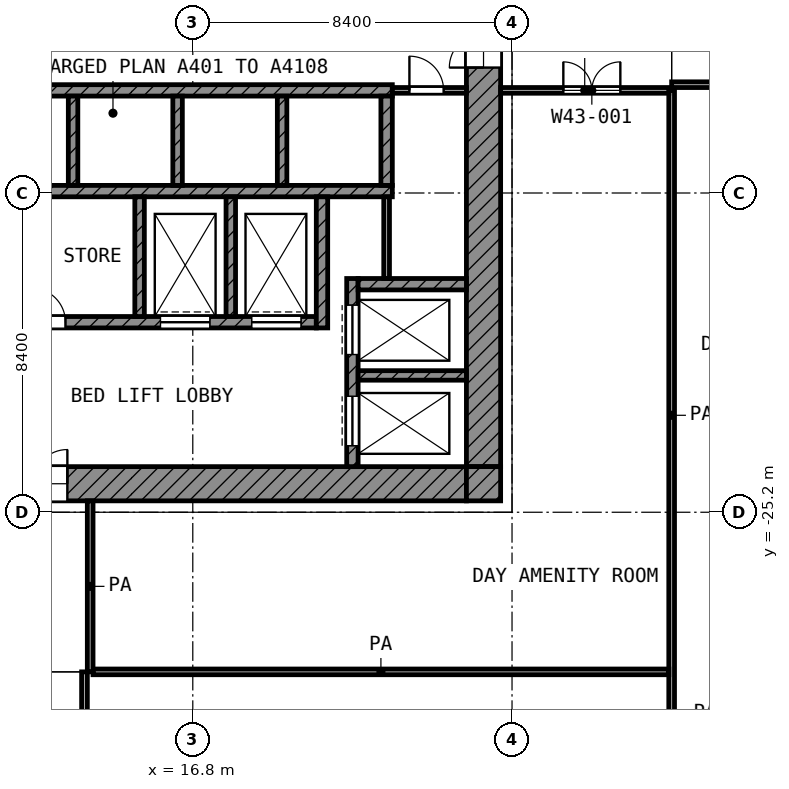
"""IFC4 building model, lengths in metres.
Left out: names, types, materials, properties, quantities, classifications, styles, units other than length and angle.
Written with IfcOpenShell. Run it as: python <this file> out.ifc"""

import sys

from ifc_helpers import new_model, si_unit, direction, frame, frame_2d, origin, place, context, subcontext, project, spatial, rectangle, extrude, element, fill, save


model = new_model("IFC4")
c1 = context("Model", 3, precision=1e-05, world=origin(), true_north=direction((0.0, 1.0)))
c2 = subcontext(c1, "Body", "Model", "MODEL_VIEW")
j1 = project(units=[si_unit("LENGTHUNIT", "METRE"), si_unit("PLANEANGLEUNIT", "RADIAN")], contexts=[c1])
p1 = place(None, origin())
s1 = spatial("IfcSite", under=j1, at=p1, CompositionType="ELEMENT")
p2 = place(p1, origin())
s2 = spatial("IfcBuilding", under=s1, at=p2, CompositionType="ELEMENT")
p3 = place(p2, frame((0.0, 0.0, 208.8)))
s3 = spatial("IfcBuildingStorey", under=s2, at=p3, CompositionType="ELEMENT", Elevation=208.8)
p4 = place(p3, frame((24.45, -24.0, 0.0), z_axis=(0.0, 0.0, 1.0), x_axis=(0.0, 1.0, 0.0)))
e1 = element("IfcWall", 1, at=p4, inside=s3, PredefinedType="SHEAR", context=c2, shape_type="SweptSolid", body=[
    extrude(rectangle(XDim=18.6, YDim=0.9, at=frame_2d((9.3, 0.0))), origin(), (0.0, 0.0, 1.0), 3.7),
])
p5 = place(p4, frame((10.5, 0.0, 0.0)))
e2 = element("IfcOpeningElement", 2, at=p5, cuts=e1, PredefinedType="OPENING", context=c2, shape_type="SweptSolid", body=[
    extrude(rectangle(XDim=1.8, YDim=2.1, at=frame_2d((0.9, 1.05))), frame((0.0, 0.46, 0.0), z_axis=(0.0, -1.0, 0.0), x_axis=(1.0, 0.0, 0.0)), (0.0, 0.0, 1.0), 0.92),
])
p6 = place(p3, frame((5.4, -24.45, 0.0), z_axis=(0.0, 0.0, 1.0), x_axis=(1.0, 0.0, 0.0)))
e3 = element("IfcWall", 3, at=p6, inside=s3, PredefinedType="SHEAR", context=c2, shape_type="SweptSolid", body=[
    extrude(rectangle(XDim=18.6, YDim=0.9, at=frame_2d((9.3, 0.0))), origin(), (0.0, 0.0, 1.0), 3.7),
])
p7 = place(p6, frame((6.3, 0.0, 0.0)))
e4 = element("IfcOpeningElement", 4, at=p7, cuts=e3, PredefinedType="OPENING", context=c2, shape_type="SweptSolid", body=[
    extrude(rectangle(XDim=1.8, YDim=2.1, at=frame_2d((0.9, 1.05))), frame((0.0, 0.46, 0.0), z_axis=(0.0, -1.0, 0.0), x_axis=(1.0, 0.0, 0.0)), (0.0, 0.0, 1.0), 0.92),
])
p8 = place(p3, frame((24.45, -24.9, 0.0), z_axis=(0.0, 0.0, 1.0), x_axis=(0.0, 1.0, 0.0)))
e5 = element("IfcWall", 5, at=p8, inside=s3, PredefinedType="SHEAR", context=c2, shape_type="SweptSolid", body=[
    extrude(rectangle(XDim=0.9, YDim=0.9, at=frame_2d((0.45, 0.0))), origin(), (0.0, 0.0, 1.0), 3.7),
])
p9 = place(p3, frame((5.4, -14.1, 0.0), z_axis=(0.0, 0.0, 1.0), x_axis=(1.0, 0.0, 0.0)))
e6 = element("IfcWall", 6, at=p9, inside=s3, PredefinedType="SHEAR", context=c2, shape_type="SweptSolid", body=[
    extrude(rectangle(XDim=16.65, YDim=0.3, at=frame_2d((8.325, 0.0))), origin(), (0.0, 0.0, 1.0), 3.7),
])
p10 = place(p9, frame((0.825, 0.0, 0.0)))
e7 = element("IfcOpeningElement", 7, at=p10, cuts=e6, PredefinedType="OPENING", context=c2, shape_type="SweptSolid", body=[
    extrude(rectangle(XDim=1.1, YDim=2.1, at=frame_2d((0.55, 1.05))), frame((0.0, 0.16, 0.0), z_axis=(0.0, -1.0, 0.0), x_axis=(1.0, 0.0, 0.0)), (0.0, 0.0, 1.0), 0.32),
])
p11 = place(p9, frame((3.575, 0.0, 0.0)))
e8 = element("IfcOpeningElement", 8, at=p11, cuts=e6, PredefinedType="OPENING", context=c2, shape_type="SweptSolid", body=[
    extrude(rectangle(XDim=1.1, YDim=2.1, at=frame_2d((0.55, 1.05))), frame((0.0, 0.16, 0.0), z_axis=(0.0, -1.0, 0.0), x_axis=(1.0, 0.0, 0.0)), (0.0, 0.0, 1.0), 0.32),
])
p12 = place(p3, frame((5.4, -16.75, 0.0), z_axis=(0.0, 0.0, 1.0), x_axis=(1.0, 0.0, 0.0)))
e9 = element("IfcWall", 9, at=p12, inside=s3, PredefinedType="SHEAR", context=c2, shape_type="SweptSolid", body=[
    extrude(rectangle(XDim=16.65, YDim=0.3, at=frame_2d((8.325, 0.0))), origin(), (0.0, 0.0, 1.0), 3.7),
])
p13 = place(p3, frame((5.4, -20.2, 0.0), z_axis=(0.0, 0.0, 1.0), x_axis=(1.0, 0.0, 0.0)))
e10 = element("IfcWall", 10, at=p13, inside=s3, PredefinedType="SHEAR", context=c2, shape_type="SweptSolid", body=[
    extrude(rectangle(XDim=14.65, YDim=0.3, at=frame_2d((7.325, 0.0))), origin(), (0.0, 0.0, 1.0), 3.7),
])
p14 = place(p13, frame((10.55, 0.0, 0.0)))
e11 = element("IfcOpeningElement", 11, at=p14, cuts=e10, PredefinedType="OPENING", context=c2, shape_type="SweptSolid", body=[
    extrude(rectangle(XDim=1.3, YDim=2.1, at=frame_2d((0.65, 1.05))), frame((0.0, 0.16, 0.0), z_axis=(0.0, -1.0, 0.0), x_axis=(1.0, 0.0, 0.0)), (0.0, 0.0, 1.0), 0.32),
])
p15 = place(p13, frame((12.95, 0.0, 0.0)))
e12 = element("IfcOpeningElement", 12, at=p15, cuts=e10, PredefinedType="OPENING", context=c2, shape_type="SweptSolid", body=[
    extrude(rectangle(XDim=1.3, YDim=2.1, at=frame_2d((0.65, 1.05))), frame((0.0, 0.16, 0.0), z_axis=(0.0, -1.0, 0.0), x_axis=(1.0, 0.0, 0.0)), (0.0, 0.0, 1.0), 0.32),
])
p16 = place(p13, frame((0.55, 0.0, 0.0)))
e13 = element("IfcOpeningElement", 13, at=p16, cuts=e10, PredefinedType="OPENING", context=c2, shape_type="SweptSolid", body=[
    extrude(rectangle(XDim=1.3, YDim=2.1, at=frame_2d((0.65, 1.05))), frame((0.0, 0.16, 0.0), z_axis=(0.0, -1.0, 0.0), x_axis=(1.0, 0.0, 0.0)), (0.0, 0.0, 1.0), 0.32),
])
p17 = place(p13, frame((2.95, 0.0, 0.0)))
e14 = element("IfcOpeningElement", 14, at=p17, cuts=e10, PredefinedType="OPENING", context=c2, shape_type="SweptSolid", body=[
    extrude(rectangle(XDim=1.3, YDim=2.1, at=frame_2d((0.65, 1.05))), frame((0.0, 0.16, 0.0), z_axis=(0.0, -1.0, 0.0), x_axis=(1.0, 0.0, 0.0)), (0.0, 0.0, 1.0), 0.32),
])
p18 = place(p13, frame((7.15, 0.0, 0.0)))
e15 = element("IfcOpeningElement", 15, at=p18, cuts=e10, PredefinedType="OPENING", context=c2, shape_type="SweptSolid", body=[
    extrude(rectangle(XDim=0.9, YDim=2.1, at=frame_2d((0.45, 1.05))), frame((0.0, 0.16, 0.0), z_axis=(0.0, -1.0, 0.0), x_axis=(1.0, 0.0, 0.0)), (0.0, 0.0, 1.0), 0.32),
])
p19 = place(p3, frame((20.2, -20.35, 0.0), z_axis=(0.0, 0.0, 1.0), x_axis=(0.0, 1.0, 0.0)))
e16 = element("IfcWall", 16, at=p19, inside=s3, PredefinedType="SHEAR", context=c2, shape_type="SweptSolid", body=[
    extrude(rectangle(XDim=3.45, YDim=0.3, at=frame_2d((1.725, 0.0))), origin(), (0.0, 0.0, 1.0), 3.7),
])
p20 = place(p3, frame((21.9, -16.6, 0.0), z_axis=(0.0, 0.0, 1.0), x_axis=(0.0, 1.0, 0.0)))
e17 = element("IfcWall", 17, at=p20, inside=s3, PredefinedType="SHEAR", context=c2, shape_type="SweptSolid", body=[
    extrude(rectangle(XDim=2.35, YDim=0.3, at=frame_2d((1.175, 0.0))), origin(), (0.0, 0.0, 1.0), 3.7),
])
p21 = place(p3, frame((21.15, -19.2, 0.0), z_axis=(0.0, 0.0, 1.0), x_axis=(1.0, 0.0, 0.0)))
e18 = element("IfcWall", 18, at=p21, inside=s3, PredefinedType="SHEAR", context=c2, shape_type="SweptSolid", body=[
    extrude(rectangle(XDim=2.85, YDim=0.3, at=frame_2d((1.425, 0.0))), origin(), (0.0, 0.0, 1.0), 3.7),
])
p22 = place(p3, frame((21.0, -24.0, 0.0), z_axis=(0.0, 0.0, 1.0), x_axis=(0.0, 1.0, 0.0)))
e19 = element("IfcWall", 19, at=p22, inside=s3, PredefinedType="SHEAR", context=c2, shape_type="SweptSolid", body=[
    extrude(rectangle(XDim=4.95, YDim=0.3, at=frame_2d((2.475, 0.0))), origin(), (0.0, 0.0, 1.0), 3.7),
])
p23 = place(p22, frame((2.95, 0.0, 0.0)))
e20 = element("IfcOpeningElement", 20, at=p23, cuts=e19, PredefinedType="OPENING", context=c2, shape_type="SweptSolid", body=[
    extrude(rectangle(XDim=1.3, YDim=2.1, at=frame_2d((0.65, 1.05))), frame((0.0, 0.16, 0.0), z_axis=(0.0, -1.0, 0.0), x_axis=(1.0, 0.0, 0.0)), (0.0, 0.0, 1.0), 0.32),
])
p24 = place(p22, frame((0.55, 0.0, 0.0)))
e21 = element("IfcOpeningElement", 21, at=p24, cuts=e19, PredefinedType="OPENING", context=c2, shape_type="SweptSolid", body=[
    extrude(rectangle(XDim=1.3, YDim=2.1, at=frame_2d((0.65, 1.05))), frame((0.0, 0.16, 0.0), z_axis=(0.0, -1.0, 0.0), x_axis=(1.0, 0.0, 0.0)), (0.0, 0.0, 1.0), 0.32),
])
p25 = place(p3, frame((21.15, -21.6, 0.0), z_axis=(0.0, 0.0, 1.0), x_axis=(1.0, 0.0, 0.0)))
e22 = element("IfcWall", 22, at=p25, inside=s3, PredefinedType="SHEAR", context=c2, shape_type="SweptSolid", body=[
    extrude(rectangle(XDim=2.85, YDim=0.25, at=frame_2d((1.425, 0.0))), origin(), (0.0, 0.0, 1.0), 3.7),
])
for number, where, z_axis, x_axis in (
    (23, (15.4, -20.05, 0.0), (0.0, 0.0, 1.0), (0.0, 1.0, 0.0)),
    (24, (17.8, -20.05, 0.0), (0.0, 0.0, 1.0), (0.0, 1.0, 0.0)),
):
    element("IfcWall", number, at=place(p3, frame(where, z_axis=z_axis, x_axis=x_axis)), inside=s3, PredefinedType="SHEAR", context=c2, shape_type="SweptSolid", body=[
        extrude(rectangle(XDim=3.15, YDim=0.25, at=frame_2d((1.575, 0.0))), origin(), (0.0, 0.0, 1.0), 3.7),
    ])
for number, where, z_axis, x_axis in (
    (25, (13.65, -16.6, 0.0), (0.0, 0.0, 1.0), (0.0, 1.0, 0.0)),
    (26, (16.4, -16.6, 0.0), (0.0, 0.0, 1.0), (0.0, 1.0, 0.0)),
    (27, (19.15, -16.6, 0.0), (0.0, 0.0, 1.0), (0.0, 1.0, 0.0)),
):
    element("IfcWall", number, at=place(p3, frame(where, z_axis=z_axis, x_axis=x_axis)), inside=s3, PredefinedType="SHEAR", context=c2, shape_type="SweptSolid", body=[
        extrude(rectangle(XDim=2.35, YDim=0.25, at=frame_2d((1.175, 0.0))), origin(), (0.0, 0.0, 1.0), 3.7),
    ])
p26 = place(p3, frame((21.9, -19.05, 0.0), z_axis=(0.0, 0.0, 1.0), x_axis=(0.0, 1.0, 0.0)))
e28 = element("IfcWall", 28, at=p26, inside=s3, PredefinedType="PARTITIONING", context=c2, shape_type="SweptSolid", body=[
    extrude(rectangle(XDim=2.15, YDim=0.15, at=frame_2d((1.075, 0.0))), origin(), (0.0, 0.0, 1.0), 3.7),
])
p27 = place(p3, frame((22.05, -14.1, 0.0), z_axis=(0.0, 0.0, 1.0), x_axis=(1.0, 0.0, 0.0)))
e29 = element("IfcWall", 29, at=p27, inside=s3, PredefinedType="PARTITIONING", context=c2, shape_type="SweptSolid", body=[
    extrude(rectangle(XDim=1.95, YDim=0.15, at=frame_2d((0.975, 0.0))), origin(), (0.0, 0.0, 1.0), 3.7),
])
p28 = place(p27, frame((0.45, 0.0, 0.0)))
e30 = element("IfcOpeningElement", 30, at=p28, cuts=e29, PredefinedType="OPENING", context=c2, shape_type="SweptSolid", body=[
    extrude(rectangle(XDim=0.9, YDim=2.1, at=frame_2d((0.45, 1.05))), frame((0.0, 0.085, 0.0), z_axis=(0.0, -1.0, 0.0), x_axis=(1.0, 0.0, 0.0)), (0.0, 0.0, 1.0), 0.17),
])
p29 = place(p3, frame((14.175, -29.4, 0.0), z_axis=(0.0, 0.0, 1.0), x_axis=(1.0, 0.0, 0.0)))
e31 = element("IfcWall", 31, at=p29, inside=s3, PredefinedType="PARTITIONING", context=c2, shape_type="SweptSolid", body=[
    extrude(rectangle(XDim=15.15, YDim=0.15, at=frame_2d((7.575, 0.0))), origin(), (0.0, 0.0, 1.0), 3.7),
])
p30 = place(p3, frame((24.9, -14.1, 0.0), z_axis=(0.0, 0.0, 1.0), x_axis=(1.0, 0.0, 0.0)))
e32 = element("IfcWall", 32, at=p30, inside=s3, PredefinedType="PARTITIONING", context=c2, shape_type="SweptSolid", body=[
    extrude(rectangle(XDim=4.425, YDim=0.15, at=frame_2d((2.212, 0.0))), origin(), (0.0, 0.0, 1.0), 3.7),
])
p31 = place(p30, frame((1.65, 0.0, 0.0)))
e33 = element("IfcOpeningElement", 33, at=p31, cuts=e32, PredefinedType="OPENING", context=c2, shape_type="SweptSolid", body=[
    extrude(rectangle(XDim=1.5, YDim=2.1, at=frame_2d((0.75, 1.05))), frame((0.0, 0.085, 0.0), z_axis=(0.0, -1.0, 0.0), x_axis=(1.0, 0.0, 0.0)), (0.0, 0.0, 1.0), 0.17),
])
p32 = place(p3, frame((29.4, -13.95, 0.0), z_axis=(0.0, 0.0, 1.0), x_axis=(1.0, 0.0, 0.0)))
e34 = element("IfcWall", 34, at=p32, inside=s3, PredefinedType="PARTITIONING", context=c2, shape_type="SweptSolid", body=[
    extrude(rectangle(XDim=37.72, YDim=0.15, at=frame_2d((18.86, 0.0))), origin(), (0.0, 0.0, 1.0), 3.7),
])
p33 = place(p32, frame((1.6, 0.0, 0.0)))
e35 = element("IfcOpeningElement", 35, at=p33, cuts=e34, PredefinedType="OPENING", context=c2, shape_type="SweptSolid", body=[
    extrude(rectangle(XDim=1.0, YDim=2.1, at=frame_2d((0.5, 1.05))), frame((0.0, 0.085, 0.0), z_axis=(0.0, -1.0, 0.0), x_axis=(1.0, 0.0, 0.0)), (0.0, 0.0, 1.0), 0.17),
])
p34 = place(p32, frame((6.0, 0.0, 0.0)))
e36 = element("IfcOpeningElement", 36, at=p34, cuts=e34, PredefinedType="OPENING", context=c2, shape_type="SweptSolid", body=[
    extrude(rectangle(XDim=1.2, YDim=2.1, at=frame_2d((0.6, 1.05))), frame((0.0, 0.085, 0.0), z_axis=(0.0, -1.0, 0.0), x_axis=(1.0, 0.0, 0.0)), (0.0, 0.0, 1.0), 0.17),
])
p35 = place(p32, frame((12.975, 0.0, 0.0)))
e37 = element("IfcOpeningElement", 37, at=p35, cuts=e34, PredefinedType="OPENING", context=c2, shape_type="SweptSolid", body=[
    extrude(rectangle(XDim=1.2, YDim=2.1, at=frame_2d((0.6, 1.05))), frame((0.0, 0.085, 0.0), z_axis=(0.0, -1.0, 0.0), x_axis=(1.0, 0.0, 0.0)), (0.0, 0.0, 1.0), 0.17),
])
p36 = place(p32, frame((11.45, 0.0, 0.0)))
e38 = element("IfcOpeningElement", 38, at=p36, cuts=e34, PredefinedType="OPENING", context=c2, shape_type="SweptSolid", body=[
    extrude(rectangle(XDim=1.2, YDim=2.1, at=frame_2d((0.6, 1.05))), frame((0.0, 0.085, 0.0), z_axis=(0.0, -1.0, 0.0), x_axis=(1.0, 0.0, 0.0)), (0.0, 0.0, 1.0), 0.17),
])
p37 = place(p32, frame((14.85, 0.0, 0.0)))
e39 = element("IfcOpeningElement", 39, at=p37, cuts=e34, PredefinedType="OPENING", context=c2, shape_type="SweptSolid", body=[
    extrude(rectangle(XDim=1.2, YDim=2.1, at=frame_2d((0.6, 1.05))), frame((0.0, 0.085, 0.0), z_axis=(0.0, -1.0, 0.0), x_axis=(1.0, 0.0, 0.0)), (0.0, 0.0, 1.0), 0.17),
])
p38 = place(p32, frame((21.6, 0.0, 0.0)))
e40 = element("IfcOpeningElement", 40, at=p38, cuts=e34, PredefinedType="OPENING", context=c2, shape_type="SweptSolid", body=[
    extrude(rectangle(XDim=1.2, YDim=2.1, at=frame_2d((0.6, 1.05))), frame((0.0, 0.085, 0.0), z_axis=(0.0, -1.0, 0.0), x_axis=(1.0, 0.0, 0.0)), (0.0, 0.0, 1.0), 0.17),
])
p39 = place(p32, frame((20.1, 0.0, 0.0)))
e41 = element("IfcOpeningElement", 41, at=p39, cuts=e34, PredefinedType="OPENING", context=c2, shape_type="SweptSolid", body=[
    extrude(rectangle(XDim=1.2, YDim=2.1, at=frame_2d((0.6, 1.05))), frame((0.0, 0.085, 0.0), z_axis=(0.0, -1.0, 0.0), x_axis=(1.0, 0.0, 0.0)), (0.0, 0.0, 1.0), 0.17),
])
p40 = place(p32, frame((18.85, 0.0, 0.0)))
e42 = element("IfcOpeningElement", 42, at=p40, cuts=e34, PredefinedType="OPENING", context=c2, shape_type="SweptSolid", body=[
    extrude(rectangle(XDim=0.9, YDim=2.1, at=frame_2d((0.45, 1.05))), frame((0.0, 0.085, 0.0), z_axis=(0.0, -1.0, 0.0), x_axis=(1.0, 0.0, 0.0)), (0.0, 0.0, 1.0), 0.17),
])
p41 = place(p32, frame((23.85, 0.0, 0.0)))
e43 = element("IfcOpeningElement", 43, at=p41, cuts=e34, PredefinedType="OPENING", context=c2, shape_type="SweptSolid", body=[
    extrude(rectangle(XDim=1.2, YDim=2.1, at=frame_2d((0.6, 1.05))), frame((0.0, 0.085, 0.0), z_axis=(0.0, -1.0, 0.0), x_axis=(1.0, 0.0, 0.0)), (0.0, 0.0, 1.0), 0.17),
])
p42 = place(p32, frame((29.475, 0.0, 0.0)))
e44 = element("IfcOpeningElement", 44, at=p42, cuts=e34, PredefinedType="OPENING", context=c2, shape_type="SweptSolid", body=[
    extrude(rectangle(XDim=1.2, YDim=2.1, at=frame_2d((0.6, 1.05))), frame((0.0, 0.085, 0.0), z_axis=(0.0, -1.0, 0.0), x_axis=(1.0, 0.0, 0.0)), (0.0, 0.0, 1.0), 0.17),
])
p43 = place(p32, frame((27.95, 0.0, 0.0)))
e45 = element("IfcOpeningElement", 45, at=p43, cuts=e34, PredefinedType="OPENING", context=c2, shape_type="SweptSolid", body=[
    extrude(rectangle(XDim=1.2, YDim=2.1, at=frame_2d((0.6, 1.05))), frame((0.0, 0.085, 0.0), z_axis=(0.0, -1.0, 0.0), x_axis=(1.0, 0.0, 0.0)), (0.0, 0.0, 1.0), 0.17),
])
p44 = place(p32, frame((31.35, 0.0, 0.0)))
e46 = element("IfcOpeningElement", 46, at=p44, cuts=e34, PredefinedType="OPENING", context=c2, shape_type="SweptSolid", body=[
    extrude(rectangle(XDim=1.2, YDim=2.1, at=frame_2d((0.6, 1.05))), frame((0.0, 0.085, 0.0), z_axis=(0.0, -1.0, 0.0), x_axis=(1.0, 0.0, 0.0)), (0.0, 0.0, 1.0), 0.17),
])
p45 = place(p32, frame((34.9, 0.0, 0.0)))
e47 = element("IfcOpeningElement", 47, at=p45, cuts=e34, PredefinedType="OPENING", context=c2, shape_type="SweptSolid", body=[
    extrude(rectangle(XDim=1.0, YDim=2.1, at=frame_2d((0.5, 1.05))), frame((0.0, 0.085, 0.0), z_axis=(0.0, -1.0, 0.0), x_axis=(1.0, 0.0, 0.0)), (0.0, 0.0, 1.0), 0.17),
])
p46 = place(p3, frame((13.95, -54.52, 0.0), z_axis=(0.0, 0.0, 1.0), x_axis=(0.0, 1.0, 0.0)))
e48 = element("IfcWall", 48, at=p46, inside=s3, PredefinedType="PARTITIONING", context=c2, shape_type="SweptSolid", body=[
    extrude(rectangle(XDim=25.12, YDim=0.15, at=frame_2d((12.56, 0.0))), origin(), (0.0, 0.0, 1.0), 3.7),
])
p47 = place(p46, frame((20.02, 0.0, 0.0)))
e49 = element("IfcOpeningElement", 49, at=p47, cuts=e48, PredefinedType="OPENING", context=c2, shape_type="SweptSolid", body=[
    extrude(rectangle(XDim=1.2, YDim=2.1, at=frame_2d((0.6, 1.05))), frame((0.0, 0.085, 0.0), z_axis=(0.0, -1.0, 0.0), x_axis=(1.0, 0.0, 0.0)), (0.0, 0.0, 1.0), 0.17),
])
p48 = place(p46, frame((12.595, 0.0, 0.0)))
e50 = element("IfcOpeningElement", 50, at=p48, cuts=e48, PredefinedType="OPENING", context=c2, shape_type="SweptSolid", body=[
    extrude(rectangle(XDim=1.2, YDim=2.1, at=frame_2d((0.6, 1.05))), frame((0.0, 0.085, 0.0), z_axis=(0.0, -1.0, 0.0), x_axis=(1.0, 0.0, 0.0)), (0.0, 0.0, 1.0), 0.17),
])
p49 = place(p46, frame((11.07, 0.0, 0.0)))
e51 = element("IfcOpeningElement", 51, at=p49, cuts=e48, PredefinedType="OPENING", context=c2, shape_type="SweptSolid", body=[
    extrude(rectangle(XDim=1.2, YDim=2.1, at=frame_2d((0.6, 1.05))), frame((0.0, 0.085, 0.0), z_axis=(0.0, -1.0, 0.0), x_axis=(1.0, 0.0, 0.0)), (0.0, 0.0, 1.0), 0.17),
])
p50 = place(p46, frame((9.07, 0.0, 0.0)))
e52 = element("IfcOpeningElement", 52, at=p50, cuts=e48, PredefinedType="OPENING", context=c2, shape_type="SweptSolid", body=[
    extrude(rectangle(XDim=1.2, YDim=2.1, at=frame_2d((0.6, 1.05))), frame((0.0, 0.085, 0.0), z_axis=(0.0, -1.0, 0.0), x_axis=(1.0, 0.0, 0.0)), (0.0, 0.0, 1.0), 0.17),
])
p51 = place(p46, frame((5.12, 0.0, 0.0)))
e53 = element("IfcOpeningElement", 53, at=p51, cuts=e48, PredefinedType="OPENING", context=c2, shape_type="SweptSolid", body=[
    extrude(rectangle(XDim=1.2, YDim=2.1, at=frame_2d((0.6, 1.05))), frame((0.0, 0.085, 0.0), z_axis=(0.0, -1.0, 0.0), x_axis=(1.0, 0.0, 0.0)), (0.0, 0.0, 1.0), 0.17),
])
p52 = place(p46, frame((1.52, 0.0, 0.0)))
e54 = element("IfcOpeningElement", 54, at=p52, cuts=e48, PredefinedType="OPENING", context=c2, shape_type="SweptSolid", body=[
    extrude(rectangle(XDim=1.0, YDim=2.1, at=frame_2d((0.5, 1.05))), frame((0.0, 0.085, 0.0), z_axis=(0.0, -1.0, 0.0), x_axis=(1.0, 0.0, 0.0)), (0.0, 0.0, 1.0), 0.17),
])
p53 = place(p3, frame((14.1, -29.4, 0.0), z_axis=(0.0, 0.0, 1.0), x_axis=(0.0, 1.0, 0.0)))
e55 = element("IfcWall", 55, at=p53, inside=s3, PredefinedType="PARTITIONING", context=c2, shape_type="SweptSolid", body=[
    extrude(rectangle(XDim=4.5, YDim=0.15, at=frame_2d((2.25, 0.0))), origin(), (0.0, 0.0, 1.0), 3.7),
])
p54 = place(p3, frame((29.4, -31.198, 0.0), z_axis=(0.0, 0.0, 1.0), x_axis=(0.0, 1.0, 0.0)))
e56 = element("IfcWall", 56, at=p54, inside=s3, PredefinedType="PARTITIONING", context=c2, shape_type="SweptSolid", body=[
    extrude(rectangle(XDim=17.098, YDim=0.15, at=frame_2d((8.549, 0.0))), origin(), (0.0, 0.0, 1.0), 3.7),
])
p55 = place(p23, origin())
e57 = element("IfcDoor", 57, at=p55, inside=s3, OperationType="DOUBLE_DOOR_SLIDING", PredefinedType="DOOR", context=c2, shape_type="SweptSolid", body=[
    extrude(rectangle(XDim=1.3, YDim=2.1, at=frame_2d((0.65, 1.05))), frame((0.0, 0.025, 0.0), z_axis=(0.0, -1.0, 0.0), x_axis=(1.0, 0.0, 0.0)), (0.0, 0.0, 1.0), 0.05),
])
fill(e20, e57)
p56 = place(p24, origin())
e58 = element("IfcDoor", 58, at=p56, inside=s3, OperationType="DOUBLE_DOOR_SLIDING", PredefinedType="DOOR", context=c2, shape_type="SweptSolid", body=[
    extrude(rectangle(XDim=1.3, YDim=2.1, at=frame_2d((0.65, 1.05))), frame((0.0, 0.025, 0.0), z_axis=(0.0, -1.0, 0.0), x_axis=(1.0, 0.0, 0.0)), (0.0, 0.0, 1.0), 0.05),
])
fill(e21, e58)
p57 = place(p14, origin())
e59 = element("IfcDoor", 59, at=p57, inside=s3, OperationType="DOUBLE_DOOR_SLIDING", PredefinedType="DOOR", context=c2, shape_type="SweptSolid", body=[
    extrude(rectangle(XDim=1.3, YDim=2.1, at=frame_2d((0.65, 1.05))), frame((0.0, 0.025, 0.0), z_axis=(0.0, -1.0, 0.0), x_axis=(1.0, 0.0, 0.0)), (0.0, 0.0, 1.0), 0.05),
])
fill(e11, e59)
p58 = place(p15, origin())
e60 = element("IfcDoor", 60, at=p58, inside=s3, OperationType="DOUBLE_DOOR_SLIDING", PredefinedType="DOOR", context=c2, shape_type="SweptSolid", body=[
    extrude(rectangle(XDim=1.3, YDim=2.1, at=frame_2d((0.65, 1.05))), frame((0.0, 0.025, 0.0), z_axis=(0.0, -1.0, 0.0), x_axis=(1.0, 0.0, 0.0)), (0.0, 0.0, 1.0), 0.05),
])
fill(e12, e60)
p59 = place(p5, origin())
e61 = element("IfcDoor", 61, at=p59, inside=s3, OperationType="DOUBLE_DOOR_SINGLE_SWING", PredefinedType="DOOR", context=c2, shape_type="SweptSolid", body=[
    extrude(rectangle(XDim=1.8, YDim=2.1, at=frame_2d((0.9, 1.05))), frame((0.0, 0.025, 0.0), z_axis=(0.0, -1.0, 0.0), x_axis=(1.0, 0.0, 0.0)), (0.0, 0.0, 1.0), 0.05),
])
fill(e2, e61)
p60 = place(p7, origin())
e62 = element("IfcDoor", 62, at=p60, inside=s3, OperationType="DOUBLE_DOOR_SINGLE_SWING", PredefinedType="DOOR", context=c2, shape_type="SweptSolid", body=[
    extrude(rectangle(XDim=1.8, YDim=2.1, at=frame_2d((0.9, 1.05))), frame((0.0, 0.025, 0.0), z_axis=(0.0, -1.0, 0.0), x_axis=(1.0, 0.0, 0.0)), (0.0, 0.0, 1.0), 0.05),
])
fill(e4, e62)
p61 = place(p28, origin())
e63 = element("IfcDoor", 63, at=p61, inside=s3, OperationType="SINGLE_SWING_LEFT", PredefinedType="DOOR", context=c2, shape_type="SweptSolid", body=[
    extrude(rectangle(XDim=0.9, YDim=2.1, at=frame_2d((0.45, 1.05))), frame((0.0, 0.025, 0.0), z_axis=(0.0, -1.0, 0.0), x_axis=(1.0, 0.0, 0.0)), (0.0, 0.0, 1.0), 0.05),
])
fill(e30, e63)
p62 = place(p18, origin())
e64 = element("IfcDoor", 64, at=p62, inside=s3, OperationType="SINGLE_SWING_LEFT", PredefinedType="DOOR", context=c2, shape_type="SweptSolid", body=[
    extrude(rectangle(XDim=0.9, YDim=2.1, at=frame_2d((0.45, 1.05))), frame((0.0, 0.025, 0.0), z_axis=(0.0, -1.0, 0.0), x_axis=(1.0, 0.0, 0.0)), (0.0, 0.0, 1.0), 0.05),
])
fill(e15, e64)
p63 = place(p31, origin())
e65 = element("IfcDoor", 65, at=p63, inside=s3, OperationType="DOUBLE_DOOR_SINGLE_SWING", PredefinedType="DOOR", context=c2, shape_type="SweptSolid", body=[
    extrude(rectangle(XDim=1.5, YDim=2.1, at=frame_2d((0.75, 1.05))), frame((0.0, 0.025, 0.0), z_axis=(0.0, -1.0, 0.0), x_axis=(1.0, 0.0, 0.0)), (0.0, 0.0, 1.0), 0.05),
])
fill(e33, e65)
save(model, sys.argv[1])
